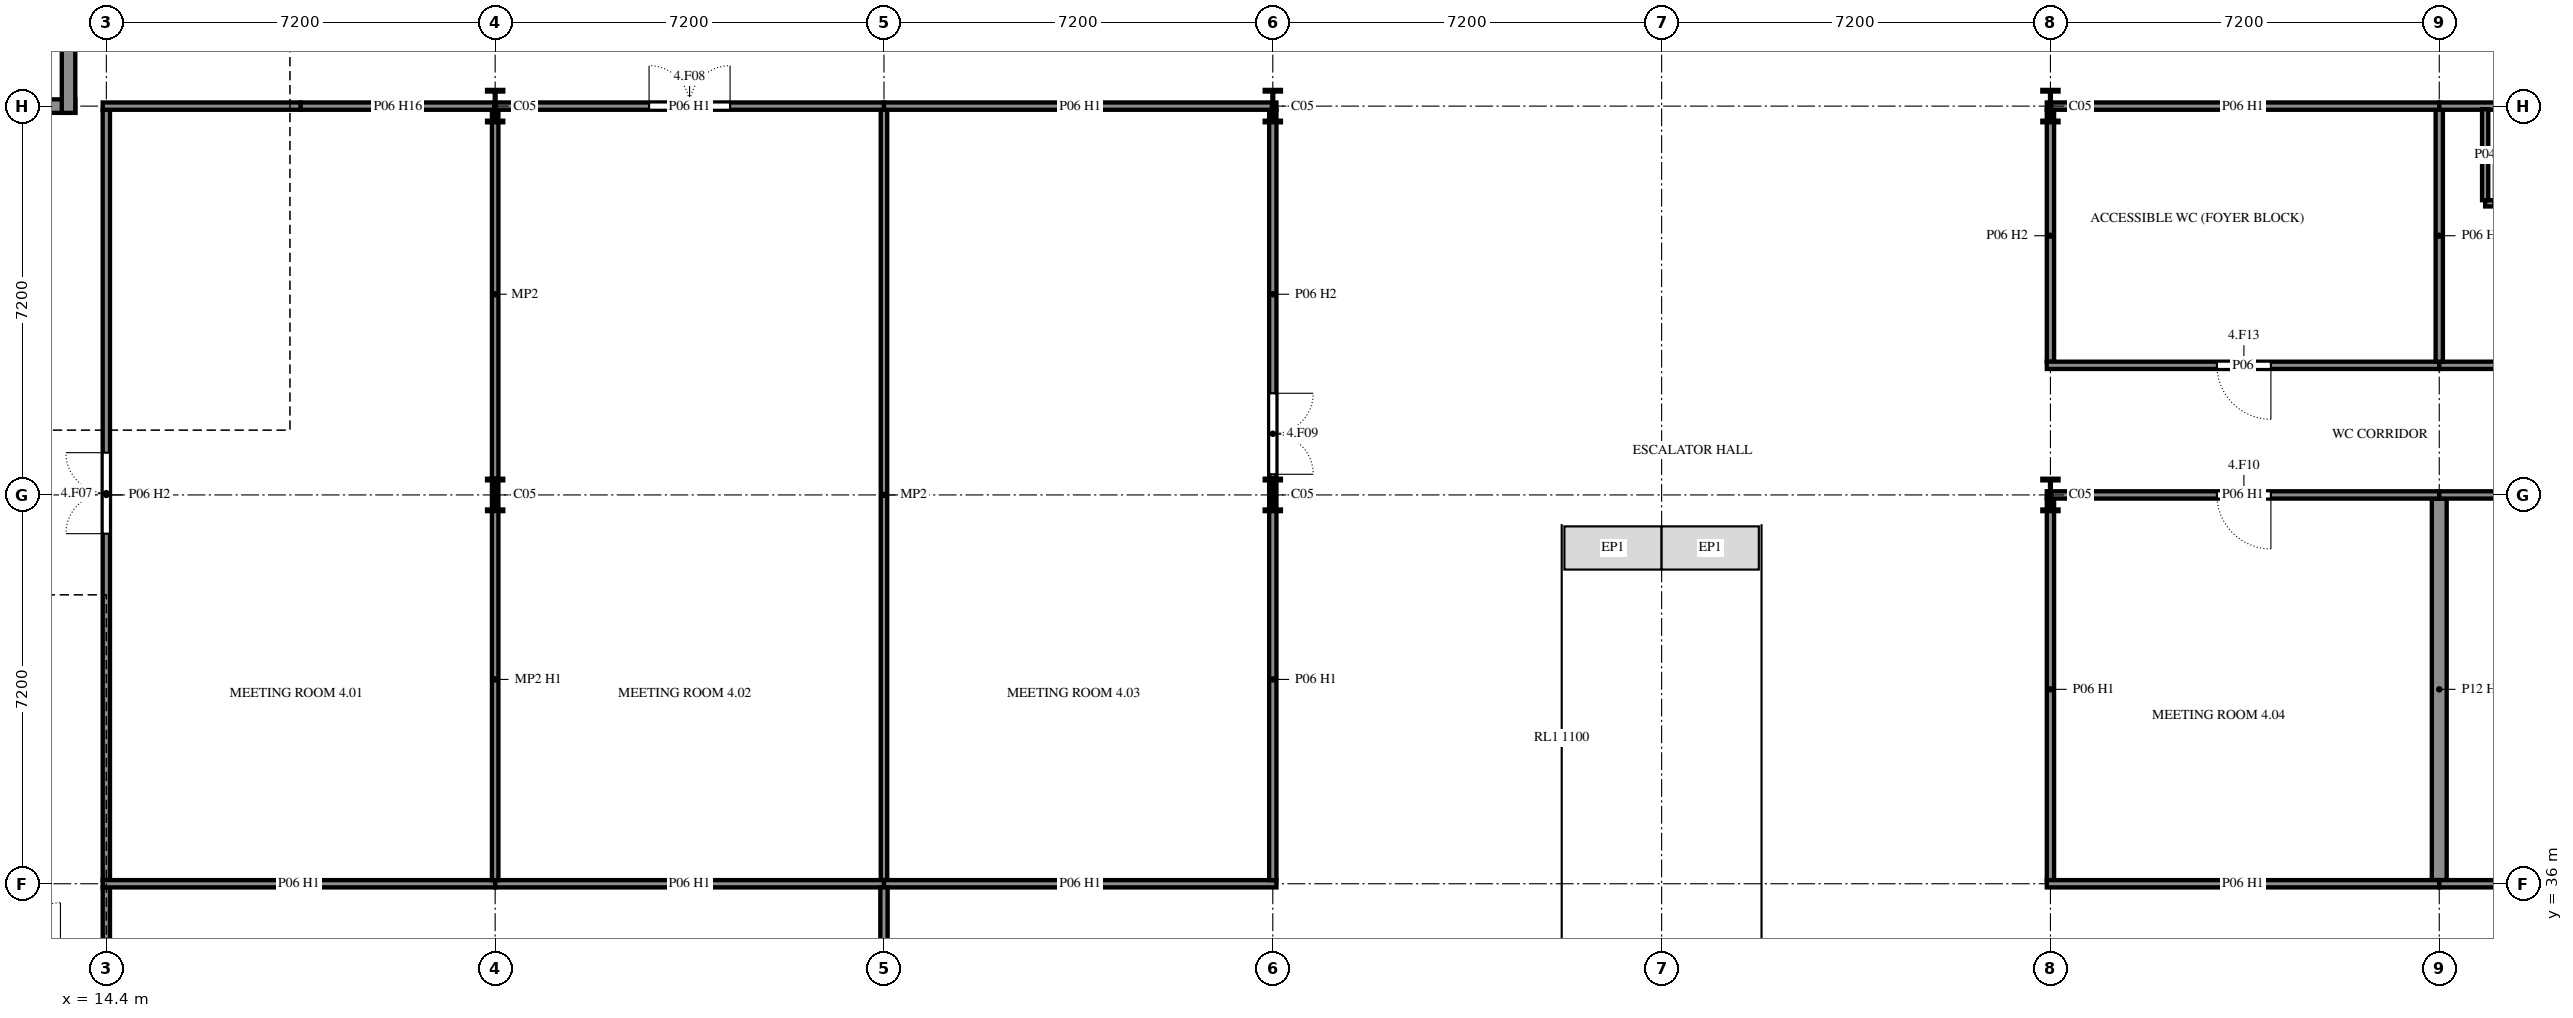
"""IFC4 building model, lengths in metres.
Left out: names, types, materials, properties, quantities, classifications, styles, units other than length and angle.
Written with IfcOpenShell. Run it as: python <this file> out.ifc"""

import sys

from ifc_helpers import new_model, si_unit, direction, frame, frame_2d, origin, origin_2d, place, context, subcontext, project, spatial, rectangle, i_section, extrude, element, fill, save


model = new_model("IFC4")
c1 = context("Model", 3, precision=1e-05, world=origin(), true_north=direction((0.0, 1.0)))
c2 = subcontext(c1, "Body", "Model", "MODEL_VIEW")
j1 = project(units=[si_unit("LENGTHUNIT", "METRE"), si_unit("PLANEANGLEUNIT", "RADIAN")], contexts=[c1])
p1 = place(None, origin())
s1 = spatial("IfcSite", under=j1, at=p1, CompositionType="ELEMENT")
p2 = place(p1, origin())
s2 = spatial("IfcBuilding", under=s1, at=p2, CompositionType="ELEMENT")
p3 = place(p2, frame((0.0, 0.0, 14.4)))
s3 = spatial("IfcBuildingStorey", under=s2, at=p3, CompositionType="ELEMENT", Elevation=14.4)
for number, where, z_axis, x_axis in (
    (1, (21.6, 43.2, 0.0), (0.0, 0.0, 1.0), (1.0, 0.0, 0.0)),
    (2, (21.6, 50.4, 0.0), (0.0, 0.0, 1.0), (1.0, 0.0, 0.0)),
    (3, (36.0, 43.2, 0.0), (0.0, 0.0, 1.0), (1.0, 0.0, 0.0)),
    (4, (36.0, 50.4, 0.0), (0.0, 0.0, 1.0), (1.0, 0.0, 0.0)),
    (5, (50.4, 43.2, 0.0), (0.0, 0.0, 1.0), (1.0, 0.0, 0.0)),
    (6, (50.4, 50.4, 0.0), (0.0, 0.0, 1.0), (1.0, 0.0, 0.0)),
):
    element("IfcColumn", number, at=place(p3, frame(where, z_axis=z_axis, x_axis=x_axis)), inside=s3, PredefinedType="COLUMN", context=c2, shape_type="SweptSolid", body=[
        extrude(i_section(OverallWidth=0.3, OverallDepth=0.6, WebThickness=0.015, FlangeThickness=0.03, FilletRadius=0.027, at=origin_2d()), origin(), (0.0, 0.0, 1.0), 3.6),
    ])
p4 = place(p3, frame((11.725, 50.4, 0.0), z_axis=(0.0, 0.0, 1.0), x_axis=(1.0, 0.0, 0.0)))
e7 = element("IfcWall", 7, at=p4, inside=s3, PredefinedType="SHEAR", context=c2, shape_type="SweptSolid", body=[
    extrude(rectangle(XDim=2.1, YDim=0.25, at=frame_2d((1.05, 0.0))), origin(), (0.0, 0.0, 1.0), 3.6),
])
p5 = place(p3, frame((13.7, 50.275, 0.0), z_axis=(0.0, 0.0, 1.0), x_axis=(0.0, 1.0, 0.0)))
e8 = element("IfcWall", 8, at=p5, inside=s3, PredefinedType="SHEAR", context=c2, shape_type="SweptSolid", body=[
    extrude(rectangle(XDim=5.25, YDim=0.25, at=frame_2d((2.625, 0.0))), origin(), (0.0, 0.0, 1.0), 3.6),
])
p6 = place(p5, frame((1.975, 0.0, 0.0)))
e9 = element("IfcOpeningElement", 9, at=p6, cuts=e8, PredefinedType="OPENING", context=c2, shape_type="SweptSolid", body=[
    extrude(rectangle(XDim=1.2, YDim=2.4, at=frame_2d((0.6, 1.2))), frame((0.0, 0.135, 0.0), z_axis=(0.0, -1.0, 0.0), x_axis=(1.0, 0.0, 0.0)), (0.0, 0.0, 1.0), 0.27),
])
p7 = place(p3, frame((14.4, 50.333, 0.0), z_axis=(0.0, 0.0, 1.0), x_axis=(0.0, -1.0, 0.0)))
e10 = element("IfcWall", 10, at=p7, inside=s3, PredefinedType="PARTITIONING", context=c2, shape_type="SweptSolid", body=[
    extrude(rectangle(XDim=14.265, YDim=0.135, at=frame_2d((7.133, 0.0))), origin(), (0.0, 0.0, 1.0), 3.12),
])
p8 = place(p7, frame((6.35, 0.0, 0.0)))
e11 = element("IfcOpeningElement", 11, at=p8, cuts=e10, PredefinedType="OPENING", context=c2, shape_type="SweptSolid", body=[
    extrude(rectangle(XDim=1.5, YDim=2.1, at=frame_2d((0.75, 1.05))), frame((0.0, 0.077, 0.0), z_axis=(0.0, -1.0, 0.0), x_axis=(1.0, 0.0, 0.0)), (0.0, 0.0, 1.0), 0.155),
])
p9 = place(p3, frame((14.4, 35.933, 0.0), z_axis=(0.0, 0.0, 1.0), x_axis=(0.0, -1.0, 0.0)))
e12 = element("IfcWall", 12, at=p9, inside=s3, PredefinedType="PARTITIONING", context=c2, shape_type="SweptSolid", body=[
    extrude(rectangle(XDim=0.973, YDim=0.135, at=frame_2d((0.486, 0.0))), origin(), (0.0, 0.0, 1.0), 3.219),
])
p10 = place(p3, frame((18.0, 50.4, 0.0), z_axis=(0.0, 0.0, 1.0), x_axis=(-1.0, 0.0, 0.0)))
e13 = element("IfcWall", 13, at=p10, inside=s3, PredefinedType="PARTITIONING", context=c2, shape_type="SweptSolid", body=[
    extrude(rectangle(XDim=3.667, YDim=0.135, at=frame_2d((1.834, 0.0))), origin(), (0.0, 0.0, 1.0), 3.09),
])
p11 = place(p3, frame((21.6, 50.333, 0.0), z_axis=(0.0, 0.0, 1.0), x_axis=(0.0, -1.0, 0.0)))
e14 = element("IfcWall", 14, at=p11, inside=s3, PredefinedType="MOVABLE", context=c2, shape_type="SweptSolid", body=[
    extrude(rectangle(XDim=6.833, YDim=0.12, at=frame_2d((3.416, 0.0))), origin(), (0.0, 0.0, 1.0), 3.12),
])
p12 = place(p3, frame((21.6, 36.0, 0.0), z_axis=(0.0, 0.0, 1.0), x_axis=(-1.0, 0.0, 0.0)))
e15 = element("IfcWall", 15, at=p12, inside=s3, PredefinedType="PARTITIONING", context=c2, shape_type="SweptSolid", body=[
    extrude(rectangle(XDim=7.268, YDim=0.135, at=frame_2d((3.634, 0.0))), origin(), (0.0, 0.0, 1.0), 2.82),
])
p13 = place(p3, frame((18.0, 50.4, 0.0), z_axis=(0.0, 0.0, 1.0), x_axis=(1.0, 0.0, 0.0)))
e16 = element("IfcWall", 16, at=p13, inside=s3, PredefinedType="PARTITIONING", context=c2, shape_type="SweptSolid", body=[
    extrude(rectangle(XDim=3.6, YDim=0.135, at=frame_2d((1.8, 0.0))), origin(), (0.0, 0.0, 1.0), 3.09),
])
p14 = place(p3, frame((28.8, 50.333, 0.0), z_axis=(0.0, 0.0, 1.0), x_axis=(0.0, -1.0, 0.0)))
e17 = element("IfcWall", 17, at=p14, inside=s3, PredefinedType="MOVABLE", context=c2, shape_type="SweptSolid", body=[
    extrude(rectangle(XDim=14.265, YDim=0.12, at=frame_2d((7.133, 0.0))), origin(), (0.0, 0.0, 1.0), 3.12),
])
p15 = place(p3, frame((28.8, 36.0, 0.0), z_axis=(0.0, 0.0, 1.0), x_axis=(-1.0, 0.0, 0.0)))
e18 = element("IfcWall", 18, at=p15, inside=s3, PredefinedType="PARTITIONING", context=c2, shape_type="SweptSolid", body=[
    extrude(rectangle(XDim=7.2, YDim=0.135, at=frame_2d((3.6, 0.0))), origin(), (0.0, 0.0, 1.0), 2.82),
])
p16 = place(p3, frame((21.6, 50.4, 0.0), z_axis=(0.0, 0.0, 1.0), x_axis=(1.0, 0.0, 0.0)))
e19 = element("IfcWall", 19, at=p16, inside=s3, PredefinedType="PARTITIONING", context=c2, shape_type="SweptSolid", body=[
    extrude(rectangle(XDim=7.2, YDim=0.135, at=frame_2d((3.6, 0.0))), origin(), (0.0, 0.0, 1.0), 2.82),
])
p17 = place(p16, frame((2.85, 0.0, 0.0)))
e20 = element("IfcOpeningElement", 20, at=p17, cuts=e19, PredefinedType="OPENING", context=c2, shape_type="SweptSolid", body=[
    extrude(rectangle(XDim=1.5, YDim=2.1, at=frame_2d((0.75, 1.05))), frame((0.0, 0.077, 0.0), z_axis=(0.0, -1.0, 0.0), x_axis=(1.0, 0.0, 0.0)), (0.0, 0.0, 1.0), 0.155),
])
p18 = place(p3, frame((36.0, 50.333, 0.0), z_axis=(0.0, 0.0, 1.0), x_axis=(0.0, -1.0, 0.0)))
e21 = element("IfcWall", 21, at=p18, inside=s3, PredefinedType="PARTITIONING", context=c2, shape_type="SweptSolid", body=[
    extrude(rectangle(XDim=6.833, YDim=0.135, at=frame_2d((3.416, 0.0))), origin(), (0.0, 0.0, 1.0), 3.12),
])
p19 = place(p18, frame((5.25, 0.0, 0.0)))
e22 = element("IfcOpeningElement", 22, at=p19, cuts=e21, PredefinedType="OPENING", context=c2, shape_type="SweptSolid", body=[
    extrude(rectangle(XDim=1.5, YDim=2.1, at=frame_2d((0.75, 1.05))), frame((0.0, 0.077, 0.0), z_axis=(0.0, -1.0, 0.0), x_axis=(1.0, 0.0, 0.0)), (0.0, 0.0, 1.0), 0.155),
])
for number, where, z_axis, x_axis in (
    (23, (36.067, 36.0, 0.0), (0.0, 0.0, 1.0), (-1.0, 0.0, 0.0)),
    (24, (28.8, 50.4, 0.0), (0.0, 0.0, 1.0), (1.0, 0.0, 0.0)),
):
    element("IfcWall", number, at=place(p3, frame(where, z_axis=z_axis, x_axis=x_axis)), inside=s3, PredefinedType="PARTITIONING", context=c2, shape_type="SweptSolid", body=[
        extrude(rectangle(XDim=7.267, YDim=0.135, at=frame_2d((3.634, 0.0))), origin(), (0.0, 0.0, 1.0), 2.82),
    ])
p20 = place(p3, frame((50.4, 43.133, 0.0), z_axis=(0.0, 0.0, 1.0), x_axis=(0.0, -1.0, 0.0)))
e25 = element("IfcWall", 25, at=p20, inside=s3, PredefinedType="PARTITIONING", context=c2, shape_type="SweptSolid", body=[
    extrude(rectangle(XDim=7.065, YDim=0.135, at=frame_2d((3.533, 0.0))), origin(), (0.0, 0.0, 1.0), 2.82),
])
p21 = place(p3, frame((50.4, 50.333, 0.0), z_axis=(0.0, 0.0, 1.0), x_axis=(0.0, -1.0, 0.0)))
e26 = element("IfcWall", 26, at=p21, inside=s3, PredefinedType="PARTITIONING", context=c2, shape_type="SweptSolid", body=[
    extrude(rectangle(XDim=4.665, YDim=0.135, at=frame_2d((2.333, 0.0))), origin(), (0.0, 0.0, 1.0), 3.12),
])
p22 = place(p3, frame((57.6, 43.133, 0.0), z_axis=(0.0, 0.0, 1.0), x_axis=(0.0, -1.0, 0.0)))
e27 = element("IfcWall", 27, at=p22, inside=s3, PredefinedType="PARTITIONING", context=c2, shape_type="SweptSolid", body=[
    extrude(rectangle(XDim=7.065, YDim=0.275, at=frame_2d((3.533, 0.0))), origin(), (0.0, 0.0, 1.0), 3.12),
])
p23 = place(p3, frame((50.333, 43.2, 0.0), z_axis=(0.0, 0.0, 1.0), x_axis=(1.0, 0.0, 0.0)))
e28 = element("IfcWall", 28, at=p23, inside=s3, PredefinedType="PARTITIONING", context=c2, shape_type="SweptSolid", body=[
    extrude(rectangle(XDim=7.268, YDim=0.135, at=frame_2d((3.634, 0.0))), origin(), (0.0, 0.0, 1.0), 2.82),
])
p24 = place(p23, frame((3.15, 0.0, 0.0)))
e29 = element("IfcOpeningElement", 29, at=p24, cuts=e28, PredefinedType="OPENING", context=c2, shape_type="SweptSolid", body=[
    extrude(rectangle(XDim=1.0, YDim=2.4, at=frame_2d((0.5, 1.2))), frame((0.0, 0.077, 0.0), z_axis=(0.0, -1.0, 0.0), x_axis=(1.0, 0.0, 0.0)), (0.0, 0.0, 1.0), 0.155),
])
p25 = place(p3, frame((57.6, 36.0, 0.0), z_axis=(0.0, 0.0, 1.0), x_axis=(-1.0, 0.0, 0.0)))
e30 = element("IfcWall", 30, at=p25, inside=s3, PredefinedType="PARTITIONING", context=c2, shape_type="SweptSolid", body=[
    extrude(rectangle(XDim=7.268, YDim=0.135, at=frame_2d((3.634, 0.0))), origin(), (0.0, 0.0, 1.0), 2.82),
])
p26 = place(p3, frame((57.6, 43.2, 0.0), z_axis=(0.0, 0.0, 1.0), x_axis=(1.0, 0.0, 0.0)))
e31 = element("IfcWall", 31, at=p26, inside=s3, PredefinedType="PARTITIONING", context=c2, shape_type="SweptSolid", body=[
    extrude(rectangle(XDim=7.2, YDim=0.135, at=frame_2d((3.6, 0.0))), origin(), (0.0, 0.0, 1.0), 2.82),
])
p27 = place(p26, frame((3.05, 0.0, 0.0)))
e32 = element("IfcOpeningElement", 32, at=p27, cuts=e31, PredefinedType="OPENING", context=c2, shape_type="SweptSolid", body=[
    extrude(rectangle(XDim=1.0, YDim=2.4, at=frame_2d((0.5, 1.2))), frame((0.0, 0.077, 0.0), z_axis=(0.0, -1.0, 0.0), x_axis=(1.0, 0.0, 0.0)), (0.0, 0.0, 1.0), 0.155),
])
p28 = place(p3, frame((64.8, 36.0, 0.0), z_axis=(0.0, 0.0, 1.0), x_axis=(-1.0, 0.0, 0.0)))
e33 = element("IfcWall", 33, at=p28, inside=s3, PredefinedType="PARTITIONING", context=c2, shape_type="SweptSolid", body=[
    extrude(rectangle(XDim=7.2, YDim=0.135, at=frame_2d((3.6, 0.0))), origin(), (0.0, 0.0, 1.0), 2.82),
])
p29 = place(p3, frame((50.333, 45.6, 0.0), z_axis=(0.0, 0.0, 1.0), x_axis=(1.0, 0.0, 0.0)))
e34 = element("IfcWall", 34, at=p29, inside=s3, PredefinedType="PARTITIONING", context=c2, shape_type="SweptSolid", body=[
    extrude(rectangle(XDim=7.268, YDim=0.135, at=frame_2d((3.634, 0.0))), origin(), (0.0, 0.0, 1.0), 3.42),
])
p30 = place(p29, frame((3.15, 0.0, 0.0)))
e35 = element("IfcOpeningElement", 35, at=p30, cuts=e34, PredefinedType="OPENING", context=c2, shape_type="SweptSolid", body=[
    extrude(rectangle(XDim=1.0, YDim=2.4, at=frame_2d((0.5, 1.2))), frame((0.0, 0.077, 0.0), z_axis=(0.0, -1.0, 0.0), x_axis=(1.0, 0.0, 0.0)), (0.0, 0.0, 1.0), 0.155),
])
p31 = place(p3, frame((57.6, 45.6, 0.0), z_axis=(0.0, 0.0, 1.0), x_axis=(1.0, 0.0, 0.0)))
e36 = element("IfcWall", 36, at=p31, inside=s3, PredefinedType="PARTITIONING", context=c2, shape_type="SweptSolid", body=[
    extrude(rectangle(XDim=7.2, YDim=0.135, at=frame_2d((3.6, 0.0))), origin(), (0.0, 0.0, 1.0), 3.42),
])
p32 = place(p31, frame((3.05, 0.0, 0.0)))
e37 = element("IfcOpeningElement", 37, at=p32, cuts=e36, PredefinedType="OPENING", context=c2, shape_type="SweptSolid", body=[
    extrude(rectangle(XDim=1.0, YDim=2.4, at=frame_2d((0.5, 1.2))), frame((0.0, 0.077, 0.0), z_axis=(0.0, -1.0, 0.0), x_axis=(1.0, 0.0, 0.0)), (0.0, 0.0, 1.0), 0.155),
])
p33 = place(p3, frame((57.6, 50.333, 0.0), z_axis=(0.0, 0.0, 1.0), x_axis=(0.0, -1.0, 0.0)))
e38 = element("IfcWall", 38, at=p33, inside=s3, PredefinedType="PARTITIONING", context=c2, shape_type="SweptSolid", body=[
    extrude(rectangle(XDim=4.665, YDim=0.135, at=frame_2d((2.333, 0.0))), origin(), (0.0, 0.0, 1.0), 3.12),
])
p34 = place(p3, frame((50.333, 50.4, 0.0), z_axis=(0.0, 0.0, 1.0), x_axis=(1.0, 0.0, 0.0)))
e39 = element("IfcWall", 39, at=p34, inside=s3, PredefinedType="PARTITIONING", context=c2, shape_type="SweptSolid", body=[
    extrude(rectangle(XDim=7.268, YDim=0.135, at=frame_2d((3.634, 0.0))), origin(), (0.0, 0.0, 1.0), 2.82),
])
p35 = place(p3, frame((57.6, 50.4, 0.0), z_axis=(0.0, 0.0, 1.0), x_axis=(1.0, 0.0, 0.0)))
e40 = element("IfcWall", 40, at=p35, inside=s3, PredefinedType="PARTITIONING", context=c2, shape_type="SweptSolid", body=[
    extrude(rectangle(XDim=7.2, YDim=0.135, at=frame_2d((3.6, 0.0))), origin(), (0.0, 0.0, 1.0), 2.82),
])
p36 = place(p3, frame((28.8, 35.933, 0.0), z_axis=(0.0, 0.0, 1.0), x_axis=(0.0, -1.0, 0.0)))
e41 = element("IfcWall", 41, at=p36, inside=s3, PredefinedType="PARTITIONING", context=c2, shape_type="SweptSolid", body=[
    extrude(rectangle(XDim=6.903, YDim=0.135, at=frame_2d((3.451, 0.0))), origin(), (0.0, 0.0, 1.0), 3.12),
])
p37 = place(p36, frame((2.95, 0.0, 0.0)))
e42 = element("IfcOpeningElement", 42, at=p37, cuts=e41, PredefinedType="OPENING", context=c2, shape_type="SweptSolid", body=[
    extrude(rectangle(XDim=1.0, YDim=2.4, at=frame_2d((0.5, 1.2))), frame((0.0, 0.077, 0.0), z_axis=(0.0, -1.0, 0.0), x_axis=(1.0, 0.0, 0.0)), (0.0, 0.0, 1.0), 0.155),
])
p38 = place(p3, frame((58.45, 48.6, 0.0), z_axis=(0.0, 0.0, 1.0), x_axis=(1.0, 0.0, 0.0)))
e43 = element("IfcWall", 43, at=p38, inside=s3, PredefinedType="PARTITIONING", context=c2, shape_type="SweptSolid", body=[
    extrude(rectangle(XDim=1.1, YDim=0.115, at=frame_2d((0.55, 0.0))), origin(), (0.0, 0.0, 1.0), 3.42),
])
p39 = place(p38, frame((0.15, 0.0, 0.0)))
e44 = element("IfcOpeningElement", 44, at=p39, cuts=e43, PredefinedType="OPENING", context=c2, shape_type="SweptSolid", body=[
    extrude(rectangle(XDim=0.8, YDim=2.1, at=frame_2d((0.4, 1.05))), frame((0.0, 0.067, 0.0), z_axis=(0.0, -1.0, 0.0), x_axis=(1.0, 0.0, 0.0)), (0.0, 0.0, 1.0), 0.135),
])
p40 = place(p3, frame((58.45, 50.343, 0.0), z_axis=(0.0, 0.0, 1.0), x_axis=(0.0, -1.0, 0.0)))
e45 = element("IfcWall", 45, at=p40, inside=s3, PredefinedType="PARTITIONING", context=c2, shape_type="SweptSolid", body=[
    extrude(rectangle(XDim=1.685, YDim=0.115, at=frame_2d((0.843, 0.0))), origin(), (0.0, 0.0, 1.0), 3.42),
])
p41 = place(p3, frame((21.6, 43.5, 0.0), z_axis=(0.0, 0.0, 1.0), x_axis=(0.0, -1.0, 0.0)))
e46 = element("IfcWall", 46, at=p41, inside=s3, PredefinedType="MOVABLE", context=c2, shape_type="SweptSolid", body=[
    extrude(rectangle(XDim=7.433, YDim=0.12, at=frame_2d((3.716, 0.0))), origin(), (0.0, 0.0, 1.0), 2.82),
])
p42 = place(p3, frame((36.0, 43.5, 0.0), z_axis=(0.0, 0.0, 1.0), x_axis=(0.0, -1.0, 0.0)))
e47 = element("IfcWall", 47, at=p42, inside=s3, PredefinedType="PARTITIONING", context=c2, shape_type="SweptSolid", body=[
    extrude(rectangle(XDim=7.433, YDim=0.135, at=frame_2d((3.716, 0.0))), origin(), (0.0, 0.0, 1.0), 2.82),
])
p43 = place(p8, frame((1.5, 0.0, 0.0), z_axis=(0.0, 0.0, 1.0), x_axis=(-1.0, 0.0, 0.0)))
e48 = element("IfcDoor", 48, at=p43, inside=s3, OperationType="DOUBLE_DOOR_SINGLE_SWING", PredefinedType="DOOR", context=c2, shape_type="SweptSolid", body=[
    extrude(rectangle(XDim=1.5, YDim=2.1, at=frame_2d((0.75, 1.05))), frame((0.0, 0.025, 0.0), z_axis=(0.0, -1.0, 0.0), x_axis=(1.0, 0.0, 0.0)), (0.0, 0.0, 1.0), 0.05),
])
fill(e11, e48)
p44 = place(p17, origin())
e49 = element("IfcDoor", 49, at=p44, inside=s3, OperationType="DOUBLE_DOOR_SINGLE_SWING", PredefinedType="DOOR", context=c2, shape_type="SweptSolid", body=[
    extrude(rectangle(XDim=1.5, YDim=2.1, at=frame_2d((0.75, 1.05))), frame((0.0, 0.025, 0.0), z_axis=(0.0, -1.0, 0.0), x_axis=(1.0, 0.0, 0.0)), (0.0, 0.0, 1.0), 0.05),
])
fill(e20, e49)
p45 = place(p19, origin())
e50 = element("IfcDoor", 50, at=p45, inside=s3, OperationType="DOUBLE_DOOR_SINGLE_SWING", PredefinedType="DOOR", context=c2, shape_type="SweptSolid", body=[
    extrude(rectangle(XDim=1.5, YDim=2.1, at=frame_2d((0.75, 1.05))), frame((0.0, 0.025, 0.0), z_axis=(0.0, -1.0, 0.0), x_axis=(1.0, 0.0, 0.0)), (0.0, 0.0, 1.0), 0.05),
])
fill(e22, e50)
p46 = place(p24, frame((1.0, 0.0, 0.0), z_axis=(0.0, 0.0, 1.0), x_axis=(-1.0, 0.0, 0.0)))
e51 = element("IfcDoor", 51, at=p46, inside=s3, OperationType="SINGLE_SWING_RIGHT", PredefinedType="DOOR", context=c2, shape_type="SweptSolid", body=[
    extrude(rectangle(XDim=1.0, YDim=2.4, at=frame_2d((0.5, 1.2))), frame((0.0, 0.025, 0.0), z_axis=(0.0, -1.0, 0.0), x_axis=(1.0, 0.0, 0.0)), (0.0, 0.0, 1.0), 0.05),
])
fill(e29, e51)
p47 = place(p30, frame((1.0, 0.0, 0.0), z_axis=(0.0, 0.0, 1.0), x_axis=(-1.0, 0.0, 0.0)))
e52 = element("IfcDoor", 52, at=p47, inside=s3, OperationType="SINGLE_SWING_RIGHT", PredefinedType="DOOR", context=c2, shape_type="SweptSolid", body=[
    extrude(rectangle(XDim=1.0, YDim=2.4, at=frame_2d((0.5, 1.2))), frame((0.0, 0.025, 0.0), z_axis=(0.0, -1.0, 0.0), x_axis=(1.0, 0.0, 0.0)), (0.0, 0.0, 1.0), 0.05),
])
fill(e35, e52)
p48 = place(p39, origin())
e53 = element("IfcDoor", 53, at=p48, inside=s3, OperationType="SINGLE_SWING_RIGHT", PredefinedType="DOOR", context=c2, shape_type="SweptSolid", body=[
    extrude(rectangle(XDim=0.8, YDim=2.1, at=frame_2d((0.4, 1.05))), frame((0.0, 0.025, 0.0), z_axis=(0.0, -1.0, 0.0), x_axis=(1.0, 0.0, 0.0)), (0.0, 0.0, 1.0), 0.05),
])
fill(e44, e53)
save(model, sys.argv[1])
